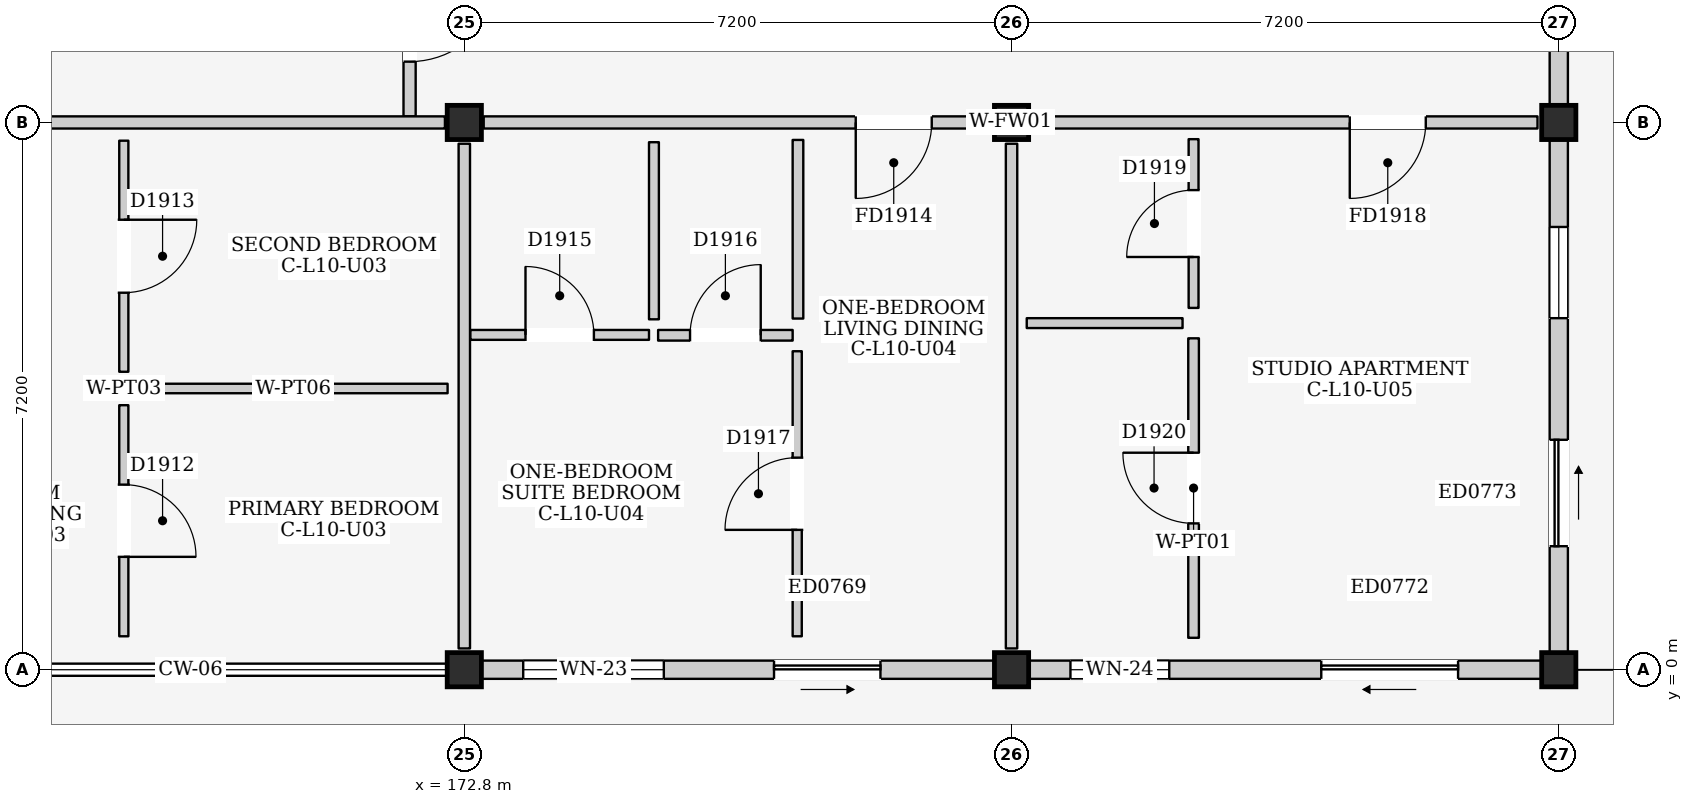
"""IFC4 building model, lengths in metres.
Left out: names, types, materials, properties, quantities, classifications, styles, units other than length and angle.
Written with IfcOpenShell. Run it as: python <this file> out.ifc"""

import sys

from ifc_helpers import new_model, si_unit, direction, frame, frame_2d, origin, origin_2d, place, context, subcontext, project, spatial, rectangle, extrude, element, fill, save


model = new_model("IFC4")
c1 = context("Model", 3, precision=1e-05, world=origin(), true_north=direction((0.0, 1.0)))
c2 = subcontext(c1, "Body", "Model", "MODEL_VIEW")
j1 = project(units=[si_unit("LENGTHUNIT", "METRE"), si_unit("PLANEANGLEUNIT", "RADIAN")], contexts=[c1])
p1 = place(None, origin())
s1 = spatial("IfcSite", under=j1, at=p1, CompositionType="ELEMENT")
p2 = place(p1, origin())
s2 = spatial("IfcBuilding", under=s1, at=p2, CompositionType="ELEMENT")
p3 = place(p2, frame((0.0, 0.0, 34.8)))
s3 = spatial("IfcBuildingStorey", under=s2, at=p3, CompositionType="ELEMENT", Elevation=34.8)
for number, where, z_axis, x_axis in (
    (1, (172.8, 0.0, 0.0), (0.0, 0.0, 1.0), (1.0, 0.0, 0.0)),
    (2, (172.8, 7.2, 0.0), (0.0, 0.0, 1.0), (1.0, 0.0, 0.0)),
    (3, (180.0, 0.0, 0.0), (0.0, 0.0, 1.0), (1.0, 0.0, 0.0)),
    (4, (180.0, 7.2, 0.0), (0.0, 0.0, 1.0), (1.0, 0.0, 0.0)),
    (5, (187.2, 0.0, 0.0), (0.0, 0.0, 1.0), (1.0, 0.0, 0.0)),
    (6, (187.2, 7.2, 0.0), (0.0, 0.0, 1.0), (1.0, 0.0, 0.0)),
):
    element("IfcColumn", number, at=place(p3, frame(where, z_axis=z_axis, x_axis=x_axis)), inside=s3, PredefinedType="COLUMN", context=c2, shape_type="SweptSolid", body=[
        extrude(rectangle(XDim=0.45, YDim=0.45, at=origin_2d()), origin(), (0.0, 0.0, 1.0), 3.2),
    ])
p4 = place(p3, frame((173.025, 0.0, 0.0), z_axis=(0.0, 0.0, 1.0), x_axis=(1.0, 0.0, 0.0)))
e7 = element("IfcWall", 7, at=p4, inside=s3, PredefinedType="ELEMENTEDWALL", context=c2, shape_type="SweptSolid", body=[
    extrude(rectangle(XDim=6.75, YDim=0.24, at=frame_2d((3.375, 0.0))), origin(), (0.0, 0.0, 1.0), 2.495),
])
p5 = place(p4, frame((3.85, 0.0, 0.0)))
e8 = element("IfcOpeningElement", 8, at=p5, cuts=e7, PredefinedType="OPENING", context=c2, shape_type="SweptSolid", body=[
    extrude(rectangle(XDim=1.4, YDim=2.1, at=frame_2d((0.7, 1.05))), frame((0.0, 0.135, 0.0), z_axis=(0.0, -1.0, 0.0), x_axis=(1.0, 0.0, 0.0)), (0.0, 0.0, 1.0), 0.27),
])
p6 = place(p4, frame((0.55, 0.0, 0.9)))
e9 = element("IfcOpeningElement", 9, at=p6, cuts=e7, PredefinedType="OPENING", context=c2, shape_type="SweptSolid", body=[
    extrude(rectangle(XDim=1.85, YDim=1.4, at=frame_2d((0.925, 0.7))), frame((0.0, 0.135, 0.0), z_axis=(0.0, -1.0, 0.0), x_axis=(1.0, 0.0, 0.0)), (0.0, 0.0, 1.0), 0.27),
])
p7 = place(p3, frame((180.225, 0.0, 0.0), z_axis=(0.0, 0.0, 1.0), x_axis=(1.0, 0.0, 0.0)))
e10 = element("IfcWall", 10, at=p7, inside=s3, PredefinedType="ELEMENTEDWALL", context=c2, shape_type="SweptSolid", body=[
    extrude(rectangle(XDim=6.75, YDim=0.24, at=frame_2d((3.375, 0.0))), origin(), (0.0, 0.0, 1.0), 2.495),
])
p8 = place(p7, frame((3.85, 0.0, 0.0)))
e11 = element("IfcOpeningElement", 11, at=p8, cuts=e10, PredefinedType="OPENING", context=c2, shape_type="SweptSolid", body=[
    extrude(rectangle(XDim=1.8, YDim=2.12, at=frame_2d((0.9, 1.06))), frame((0.0, 0.135, 0.0), z_axis=(0.0, -1.0, 0.0), x_axis=(1.0, 0.0, 0.0)), (0.0, 0.0, 1.0), 0.27),
])
p9 = place(p7, frame((0.55, 0.0, 0.9)))
e12 = element("IfcOpeningElement", 12, at=p9, cuts=e10, PredefinedType="OPENING", context=c2, shape_type="SweptSolid", body=[
    extrude(rectangle(XDim=1.3, YDim=1.25, at=frame_2d((0.65, 0.625))), frame((0.0, 0.135, 0.0), z_axis=(0.0, -1.0, 0.0), x_axis=(1.0, 0.0, 0.0)), (0.0, 0.0, 1.0), 0.27),
])
p10 = place(p3, frame((187.2, 0.225, 0.0), z_axis=(0.0, 0.0, 1.0), x_axis=(0.0, 1.0, 0.0)))
e13 = element("IfcWall", 13, at=p10, inside=s3, PredefinedType="ELEMENTEDWALL", context=c2, shape_type="SweptSolid", body=[
    extrude(rectangle(XDim=6.75, YDim=0.24, at=frame_2d((3.375, 0.0))), origin(), (0.0, 0.0, 1.0), 2.495),
])
p11 = place(p10, frame((1.4, 0.0, 0.0)))
e14 = element("IfcOpeningElement", 14, at=p11, cuts=e13, PredefinedType="OPENING", context=c2, shape_type="SweptSolid", body=[
    extrude(rectangle(XDim=1.4, YDim=2.1, at=frame_2d((0.7, 1.05))), frame((0.0, 0.135, 0.0), z_axis=(0.0, -1.0, 0.0), x_axis=(1.0, 0.0, 0.0)), (0.0, 0.0, 1.0), 0.27),
])
p12 = place(p10, frame((4.4, 0.0, 0.95)))
e15 = element("IfcOpeningElement", 15, at=p12, cuts=e13, PredefinedType="OPENING", context=c2, shape_type="SweptSolid", body=[
    extrude(rectangle(XDim=1.2, YDim=1.35, at=frame_2d((0.6, 0.675))), frame((0.0, 0.135, 0.0), z_axis=(0.0, -1.0, 0.0), x_axis=(1.0, 0.0, 0.0)), (0.0, 0.0, 1.0), 0.27),
])
p13 = place(p3, frame((187.2, 7.425, 0.0), z_axis=(0.0, 0.0, 1.0), x_axis=(0.0, 1.0, 0.0)))
e16 = element("IfcWall", 16, at=p13, inside=s3, PredefinedType="ELEMENTEDWALL", context=c2, shape_type="SweptSolid", body=[
    extrude(rectangle(XDim=6.75, YDim=0.24, at=frame_2d((3.375, 0.0))), origin(), (0.0, 0.0, 1.0), 2.495),
])
p14 = place(p13, frame((3.65, 0.0, 0.0)))
e17 = element("IfcOpeningElement", 17, at=p14, cuts=e16, PredefinedType="OPENING", context=c2, shape_type="SweptSolid", body=[
    extrude(rectangle(XDim=1.4, YDim=2.1, at=frame_2d((0.7, 1.05))), frame((0.0, 0.135, 0.0), z_axis=(0.0, -1.0, 0.0), x_axis=(1.0, 0.0, 0.0)), (0.0, 0.0, 1.0), 0.27),
])
p15 = place(p3, frame((172.08, 7.28, 0.0), z_axis=(0.0, 0.0, 1.0), x_axis=(0.0, 1.0, 0.0)))
e18 = element("IfcWall", 18, at=p15, inside=s3, PredefinedType="PARTITIONING", context=c2, shape_type="SweptSolid", body=[
    extrude(rectangle(XDim=4.32, YDim=0.16, at=frame_2d((2.16, 0.0))), origin(), (0.0, 0.0, 1.0), 2.96),
])
p16 = place(p15, frame((0.72, 0.0, 0.0)))
e19 = element("IfcOpeningElement", 19, at=p16, cuts=e18, PredefinedType="OPENING", context=c2, shape_type="SweptSolid", body=[
    extrude(rectangle(XDim=1.2, YDim=2.2, at=frame_2d((0.6, 1.1))), frame((0.0, 0.095, 0.0), z_axis=(0.0, -1.0, 0.0), x_axis=(1.0, 0.0, 0.0)), (0.0, 0.0, 1.0), 0.19),
])
p17 = place(p3, frame((165.855, 7.2, 0.0), z_axis=(0.0, 0.0, 1.0), x_axis=(1.0, 0.0, 0.0)))
e20 = element("IfcWall", 20, at=p17, inside=s3, PredefinedType="PARTITIONING", context=c2, shape_type="SweptSolid", body=[
    extrude(rectangle(XDim=6.69, YDim=0.16, at=frame_2d((3.345, 0.0))), origin(), (0.0, 0.0, 1.0), 2.345),
])
p18 = place(p3, frame((172.8, 0.28, 0.0), z_axis=(0.0, 0.0, 1.0), x_axis=(0.0, 1.0, 0.0)))
e21 = element("IfcWall", 21, at=p18, inside=s3, PredefinedType="PARTITIONING", context=c2, shape_type="SweptSolid", body=[
    extrude(rectangle(XDim=6.64, YDim=0.15, at=frame_2d((3.32, 0.0))), origin(), (0.0, 0.0, 1.0), 2.445),
])
p19 = place(p3, frame((168.32, 0.44, 0.0), z_axis=(0.0, 0.0, 1.0), x_axis=(0.0, 1.0, 0.0)))
e22 = element("IfcWall", 22, at=p19, inside=s3, PredefinedType="PARTITIONING", context=c2, shape_type="SweptSolid", body=[
    extrude(rectangle(XDim=3.04, YDim=0.12, at=frame_2d((1.52, 0.0))), origin(), (0.0, 0.0, 1.0), 2.96),
])
p20 = place(p19, frame((1.045, 0.0, 0.0)))
e23 = element("IfcOpeningElement", 23, at=p20, cuts=e22, PredefinedType="OPENING", context=c2, shape_type="SweptSolid", body=[
    extrude(rectangle(XDim=0.95, YDim=2.15, at=frame_2d((0.475, 1.075))), frame((0.0, 0.075, 0.0), z_axis=(0.0, -1.0, 0.0), x_axis=(1.0, 0.0, 0.0)), (0.0, 0.0, 1.0), 0.15),
])
p21 = place(p3, frame((168.52, 3.7, 0.0), z_axis=(0.0, 0.0, 1.0), x_axis=(1.0, 0.0, 0.0)))
e24 = element("IfcWall", 24, at=p21, inside=s3, PredefinedType="PARTITIONING", context=c2, shape_type="SweptSolid", body=[
    extrude(rectangle(XDim=4.06, YDim=0.125, at=frame_2d((2.03, 0.0))), origin(), (0.0, 0.0, 1.0), 2.96),
])
p22 = place(p3, frame((168.32, 3.92, 0.0), z_axis=(0.0, 0.0, 1.0), x_axis=(0.0, 1.0, 0.0)))
e25 = element("IfcWall", 25, at=p22, inside=s3, PredefinedType="PARTITIONING", context=c2, shape_type="SweptSolid", body=[
    extrude(rectangle(XDim=3.04, YDim=0.12, at=frame_2d((1.52, 0.0))), origin(), (0.0, 0.0, 1.0), 2.96),
])
p23 = place(p22, frame((1.04, 0.0, 0.0)))
e26 = element("IfcOpeningElement", 26, at=p23, cuts=e25, PredefinedType="OPENING", context=c2, shape_type="SweptSolid", body=[
    extrude(rectangle(XDim=0.96, YDim=2.15, at=frame_2d((0.48, 1.075))), frame((0.0, 0.075, 0.0), z_axis=(0.0, -1.0, 0.0), x_axis=(1.0, 0.0, 0.0)), (0.0, 0.0, 1.0), 0.15),
])
p24 = place(p3, frame((173.055, 7.2, 0.0), z_axis=(0.0, 0.0, 1.0), x_axis=(1.0, 0.0, 0.0)))
e27 = element("IfcWall", 27, at=p24, inside=s3, PredefinedType="PARTITIONING", context=c2, shape_type="SweptSolid", body=[
    extrude(rectangle(XDim=6.69, YDim=0.16, at=frame_2d((3.345, 0.0))), origin(), (0.0, 0.0, 1.0), 2.345),
])
p25 = place(p24, frame((4.895, 0.0, 0.0)))
e28 = element("IfcOpeningElement", 28, at=p25, cuts=e27, PredefinedType="OPENING", context=c2, shape_type="SweptSolid", body=[
    extrude(rectangle(XDim=1.0, YDim=2.15, at=frame_2d((0.5, 1.075))), frame((0.0, 0.095, 0.0), z_axis=(0.0, -1.0, 0.0), x_axis=(1.0, 0.0, 0.0)), (0.0, 0.0, 1.0), 0.19),
])
p26 = place(p3, frame((180.0, 0.28, 0.0), z_axis=(0.0, 0.0, 1.0), x_axis=(0.0, 1.0, 0.0)))
e29 = element("IfcWall", 29, at=p26, inside=s3, PredefinedType="PARTITIONING", context=c2, shape_type="SweptSolid", body=[
    extrude(rectangle(XDim=6.64, YDim=0.15, at=frame_2d((3.32, 0.0))), origin(), (0.0, 0.0, 1.0), 2.445),
])
p27 = place(p3, frame((172.88, 4.405, 0.0), z_axis=(0.0, 0.0, 1.0), x_axis=(1.0, 0.0, 0.0)))
e30 = element("IfcWall", 30, at=p27, inside=s3, PredefinedType="PARTITIONING", context=c2, shape_type="SweptSolid", body=[
    extrude(rectangle(XDim=2.35, YDim=0.13, at=frame_2d((1.175, 0.0))), origin(), (0.0, 0.0, 1.0), 2.96),
])
p28 = place(p27, frame((0.725, 0.0, 0.0)))
e31 = element("IfcOpeningElement", 31, at=p28, cuts=e30, PredefinedType="OPENING", context=c2, shape_type="SweptSolid", body=[
    extrude(rectangle(XDim=0.9, YDim=2.1, at=frame_2d((0.45, 1.05))), frame((0.0, 0.08, 0.0), z_axis=(0.0, -1.0, 0.0), x_axis=(1.0, 0.0, 0.0)), (0.0, 0.0, 1.0), 0.16),
])
p29 = place(p3, frame((175.295, 4.61, 0.0), z_axis=(0.0, 0.0, 1.0), x_axis=(0.0, 1.0, 0.0)))
e32 = element("IfcWall", 32, at=p29, inside=s3, PredefinedType="PARTITIONING", context=c2, shape_type="SweptSolid", body=[
    extrude(rectangle(XDim=2.33, YDim=0.13, at=frame_2d((1.165, 0.0))), origin(), (0.0, 0.0, 1.0), 2.96),
])
p30 = place(p3, frame((175.35, 4.4, 0.0), z_axis=(0.0, 0.0, 1.0), x_axis=(1.0, 0.0, 0.0)))
e33 = element("IfcWall", 33, at=p30, inside=s3, PredefinedType="PARTITIONING", context=c2, shape_type="SweptSolid", body=[
    extrude(rectangle(XDim=1.77, YDim=0.14, at=frame_2d((0.885, 0.0))), origin(), (0.0, 0.0, 1.0), 2.96),
])
p31 = place(p30, frame((0.42, 0.0, 0.0)))
e34 = element("IfcOpeningElement", 34, at=p31, cuts=e33, PredefinedType="OPENING", context=c2, shape_type="SweptSolid", body=[
    extrude(rectangle(XDim=0.93, YDim=2.14, at=frame_2d((0.465, 1.07))), frame((0.0, 0.085, 0.0), z_axis=(0.0, -1.0, 0.0), x_axis=(1.0, 0.0, 0.0)), (0.0, 0.0, 1.0), 0.17),
])
p32 = place(p3, frame((177.19, 4.62, 0.0), z_axis=(0.0, 0.0, 1.0), x_axis=(0.0, 1.0, 0.0)))
e35 = element("IfcWall", 35, at=p32, inside=s3, PredefinedType="PARTITIONING", context=c2, shape_type="SweptSolid", body=[
    extrude(rectangle(XDim=2.35, YDim=0.14, at=frame_2d((1.175, 0.0))), origin(), (0.0, 0.0, 1.0), 2.96),
])
p33 = place(p3, frame((177.18, 0.44, 0.0), z_axis=(0.0, 0.0, 1.0), x_axis=(0.0, 1.0, 0.0)))
e36 = element("IfcWall", 36, at=p33, inside=s3, PredefinedType="PARTITIONING", context=c2, shape_type="SweptSolid", body=[
    extrude(rectangle(XDim=3.75, YDim=0.12, at=frame_2d((1.875, 0.0))), origin(), (0.0, 0.0, 1.0), 2.96),
])
p34 = place(p33, frame((1.4, 0.0, 0.0)))
e37 = element("IfcOpeningElement", 37, at=p34, cuts=e36, PredefinedType="OPENING", context=c2, shape_type="SweptSolid", body=[
    extrude(rectangle(XDim=0.95, YDim=2.15, at=frame_2d((0.475, 1.075))), frame((0.0, 0.075, 0.0), z_axis=(0.0, -1.0, 0.0), x_axis=(1.0, 0.0, 0.0)), (0.0, 0.0, 1.0), 0.15),
])
p35 = place(p3, frame((180.255, 7.2, 0.0), z_axis=(0.0, 0.0, 1.0), x_axis=(1.0, 0.0, 0.0)))
e38 = element("IfcWall", 38, at=p35, inside=s3, PredefinedType="PARTITIONING", context=c2, shape_type="SweptSolid", body=[
    extrude(rectangle(XDim=6.665, YDim=0.16, at=frame_2d((3.333, 0.0))), origin(), (0.0, 0.0, 1.0), 2.345),
])
p36 = place(p35, frame((4.195, 0.0, 0.0)))
e39 = element("IfcOpeningElement", 39, at=p36, cuts=e38, PredefinedType="OPENING", context=c2, shape_type="SweptSolid", body=[
    extrude(rectangle(XDim=1.0, YDim=2.15, at=frame_2d((0.5, 1.075))), frame((0.0, 0.095, 0.0), z_axis=(0.0, -1.0, 0.0), x_axis=(1.0, 0.0, 0.0)), (0.0, 0.0, 1.0), 0.19),
])
p37 = place(p3, frame((180.2, 4.56, 0.0), z_axis=(0.0, 0.0, 1.0), x_axis=(1.0, 0.0, 0.0)))
e40 = element("IfcWall", 40, at=p37, inside=s3, PredefinedType="PARTITIONING", context=c2, shape_type="SweptSolid", body=[
    extrude(rectangle(XDim=2.05, YDim=0.13, at=frame_2d((1.025, 0.0))), origin(), (0.0, 0.0, 1.0), 2.96),
])
p38 = place(p3, frame((182.395, 4.76, 0.0), z_axis=(0.0, 0.0, 1.0), x_axis=(0.0, 1.0, 0.0)))
e41 = element("IfcWall", 41, at=p38, inside=s3, PredefinedType="PARTITIONING", context=c2, shape_type="SweptSolid", body=[
    extrude(rectangle(XDim=2.22, YDim=0.13, at=frame_2d((1.11, 0.0))), origin(), (0.0, 0.0, 1.0), 2.96),
])
p39 = place(p38, frame((0.67, 0.0, 0.0)))
e42 = element("IfcOpeningElement", 42, at=p39, cuts=e41, PredefinedType="OPENING", context=c2, shape_type="SweptSolid", body=[
    extrude(rectangle(XDim=0.88, YDim=2.1, at=frame_2d((0.44, 1.05))), frame((0.0, 0.08, 0.0), z_axis=(0.0, -1.0, 0.0), x_axis=(1.0, 0.0, 0.0)), (0.0, 0.0, 1.0), 0.16),
])
p40 = place(p3, frame((182.395, 0.42, 0.0), z_axis=(0.0, 0.0, 1.0), x_axis=(0.0, 1.0, 0.0)))
e43 = element("IfcWall", 43, at=p40, inside=s3, PredefinedType="PARTITIONING", context=c2, shape_type="SweptSolid", body=[
    extrude(rectangle(XDim=3.94, YDim=0.14, at=frame_2d((1.97, 0.0))), origin(), (0.0, 0.0, 1.0), 2.96),
])
p41 = place(p40, frame((1.505, 0.0, 0.0)))
e44 = element("IfcOpeningElement", 44, at=p41, cuts=e43, PredefinedType="OPENING", context=c2, shape_type="SweptSolid", body=[
    extrude(rectangle(XDim=0.93, YDim=2.14, at=frame_2d((0.465, 1.07))), frame((0.0, 0.085, 0.0), z_axis=(0.0, -1.0, 0.0), x_axis=(1.0, 0.0, 0.0)), (0.0, 0.0, 1.0), 0.17),
])
p42 = place(p5, frame((1.4, 0.0, 0.0), z_axis=(0.0, 0.0, 1.0), x_axis=(-1.0, 0.0, 0.0)))
e45 = element("IfcDoor", 45, at=p42, inside=s3, OperationType="SLIDING_TO_RIGHT", PredefinedType="DOOR", context=c2, shape_type="SweptSolid", body=[
    extrude(rectangle(XDim=1.4, YDim=2.1, at=frame_2d((0.7, 1.05))), frame((0.0, 0.025, 0.0), z_axis=(0.0, -1.0, 0.0), x_axis=(1.0, 0.0, 0.0)), (0.0, 0.0, 1.0), 0.05),
])
fill(e8, e45)
p43 = place(p6, origin())
e46 = element("IfcWindow", 46, at=p43, inside=s3, PartitioningType="DOUBLE_PANEL_VERTICAL", PredefinedType="WINDOW", context=c2, shape_type="SweptSolid", body=[
    extrude(rectangle(XDim=1.85, YDim=1.4, at=frame_2d((0.925, 0.7))), frame((0.0, 0.03, 0.0), z_axis=(0.0, -1.0, 0.0), x_axis=(1.0, 0.0, 0.0)), (0.0, 0.0, 1.0), 0.06),
])
fill(e9, e46)
p44 = place(p8, frame((1.8, 0.0, 0.0), z_axis=(0.0, 0.0, 1.0), x_axis=(-1.0, 0.0, 0.0)))
e47 = element("IfcDoor", 47, at=p44, inside=s3, OperationType="SLIDING_TO_LEFT", PredefinedType="DOOR", context=c2, shape_type="SweptSolid", body=[
    extrude(rectangle(XDim=1.8, YDim=2.12, at=frame_2d((0.9, 1.06))), frame((0.0, 0.025, 0.0), z_axis=(0.0, -1.0, 0.0), x_axis=(1.0, 0.0, 0.0)), (0.0, 0.0, 1.0), 0.05),
])
fill(e11, e47)
p45 = place(p9, origin())
e48 = element("IfcWindow", 48, at=p45, inside=s3, PartitioningType="SINGLE_PANEL", PredefinedType="WINDOW", context=c2, shape_type="SweptSolid", body=[
    extrude(rectangle(XDim=1.3, YDim=1.25, at=frame_2d((0.65, 0.625))), frame((0.0, 0.03, 0.0), z_axis=(0.0, -1.0, 0.0), x_axis=(1.0, 0.0, 0.0)), (0.0, 0.0, 1.0), 0.06),
])
fill(e12, e48)
p46 = place(p11, frame((1.4, 0.0, 0.0), z_axis=(0.0, 0.0, 1.0), x_axis=(-1.0, 0.0, 0.0)))
e49 = element("IfcDoor", 49, at=p46, inside=s3, OperationType="SLIDING_TO_RIGHT", PredefinedType="DOOR", context=c2, shape_type="SweptSolid", body=[
    extrude(rectangle(XDim=1.4, YDim=2.1, at=frame_2d((0.7, 1.05))), frame((0.0, 0.025, 0.0), z_axis=(0.0, -1.0, 0.0), x_axis=(1.0, 0.0, 0.0)), (0.0, 0.0, 1.0), 0.05),
])
fill(e14, e49)
p47 = place(p12, origin())
e50 = element("IfcWindow", 50, at=p47, inside=s3, PartitioningType="SINGLE_PANEL", PredefinedType="WINDOW", context=c2, shape_type="SweptSolid", body=[
    extrude(rectangle(XDim=1.2, YDim=1.35, at=frame_2d((0.6, 0.675))), frame((0.0, 0.03, 0.0), z_axis=(0.0, -1.0, 0.0), x_axis=(1.0, 0.0, 0.0)), (0.0, 0.0, 1.0), 0.06),
])
fill(e15, e50)
p48 = place(p16, frame((1.2, 0.0, 0.0), z_axis=(0.0, 0.0, 1.0), x_axis=(-1.0, 0.0, 0.0)))
e51 = element("IfcDoor", 51, at=p48, inside=s3, OperationType="SINGLE_SWING_LEFT", PredefinedType="DOOR", context=c2, shape_type="SweptSolid", body=[
    extrude(rectangle(XDim=1.2, YDim=2.2, at=frame_2d((0.6, 1.1))), frame((0.0, 0.025, 0.0), z_axis=(0.0, -1.0, 0.0), x_axis=(1.0, 0.0, 0.0)), (0.0, 0.0, 1.0), 0.05),
])
fill(e19, e51)
p49 = place(p20, frame((0.95, 0.0, 0.0), z_axis=(0.0, 0.0, 1.0), x_axis=(-1.0, 0.0, 0.0)))
e52 = element("IfcDoor", 52, at=p49, inside=s3, OperationType="SINGLE_SWING_RIGHT", PredefinedType="DOOR", context=c2, shape_type="SweptSolid", body=[
    extrude(rectangle(XDim=0.95, YDim=2.15, at=frame_2d((0.475, 1.075))), frame((0.0, 0.025, 0.0), z_axis=(0.0, -1.0, 0.0), x_axis=(1.0, 0.0, 0.0)), (0.0, 0.0, 1.0), 0.05),
])
fill(e23, e52)
p50 = place(p23, frame((0.96, 0.0, 0.0), z_axis=(0.0, 0.0, 1.0), x_axis=(-1.0, 0.0, 0.0)))
e53 = element("IfcDoor", 53, at=p50, inside=s3, OperationType="SINGLE_SWING_LEFT", PredefinedType="DOOR", context=c2, shape_type="SweptSolid", body=[
    extrude(rectangle(XDim=0.96, YDim=2.15, at=frame_2d((0.48, 1.075))), frame((0.0, 0.025, 0.0), z_axis=(0.0, -1.0, 0.0), x_axis=(1.0, 0.0, 0.0)), (0.0, 0.0, 1.0), 0.05),
])
fill(e26, e53)
p51 = place(p25, frame((1.0, 0.0, 0.0), z_axis=(0.0, 0.0, 1.0), x_axis=(-1.0, 0.0, 0.0)))
e54 = element("IfcDoor", 54, at=p51, inside=s3, OperationType="SINGLE_SWING_RIGHT", PredefinedType="DOOR", context=c2, shape_type="SweptSolid", body=[
    extrude(rectangle(XDim=1.0, YDim=2.15, at=frame_2d((0.5, 1.075))), frame((0.0, 0.025, 0.0), z_axis=(0.0, -1.0, 0.0), x_axis=(1.0, 0.0, 0.0)), (0.0, 0.0, 1.0), 0.05),
])
fill(e28, e54)
p52 = place(p28, origin())
e55 = element("IfcDoor", 55, at=p52, inside=s3, OperationType="SINGLE_SWING_LEFT", PredefinedType="DOOR", context=c2, shape_type="SweptSolid", body=[
    extrude(rectangle(XDim=0.9, YDim=2.1, at=frame_2d((0.45, 1.05))), frame((0.0, 0.025, 0.0), z_axis=(0.0, -1.0, 0.0), x_axis=(1.0, 0.0, 0.0)), (0.0, 0.0, 1.0), 0.05),
])
fill(e31, e55)
p53 = place(p31, origin())
e56 = element("IfcDoor", 56, at=p53, inside=s3, OperationType="SINGLE_SWING_RIGHT", PredefinedType="DOOR", context=c2, shape_type="SweptSolid", body=[
    extrude(rectangle(XDim=0.93, YDim=2.14, at=frame_2d((0.465, 1.07))), frame((0.0, 0.025, 0.0), z_axis=(0.0, -1.0, 0.0), x_axis=(1.0, 0.0, 0.0)), (0.0, 0.0, 1.0), 0.05),
])
fill(e34, e56)
p54 = place(p34, origin())
e57 = element("IfcDoor", 57, at=p54, inside=s3, OperationType="SINGLE_SWING_LEFT", PredefinedType="DOOR", context=c2, shape_type="SweptSolid", body=[
    extrude(rectangle(XDim=0.95, YDim=2.15, at=frame_2d((0.475, 1.075))), frame((0.0, 0.025, 0.0), z_axis=(0.0, -1.0, 0.0), x_axis=(1.0, 0.0, 0.0)), (0.0, 0.0, 1.0), 0.05),
])
fill(e37, e57)
p55 = place(p36, frame((1.0, 0.0, 0.0), z_axis=(0.0, 0.0, 1.0), x_axis=(-1.0, 0.0, 0.0)))
e58 = element("IfcDoor", 58, at=p55, inside=s3, OperationType="SINGLE_SWING_RIGHT", PredefinedType="DOOR", context=c2, shape_type="SweptSolid", body=[
    extrude(rectangle(XDim=1.0, YDim=2.15, at=frame_2d((0.5, 1.075))), frame((0.0, 0.025, 0.0), z_axis=(0.0, -1.0, 0.0), x_axis=(1.0, 0.0, 0.0)), (0.0, 0.0, 1.0), 0.05),
])
fill(e39, e58)
p56 = place(p39, origin())
e59 = element("IfcDoor", 59, at=p56, inside=s3, OperationType="SINGLE_SWING_LEFT", PredefinedType="DOOR", context=c2, shape_type="SweptSolid", body=[
    extrude(rectangle(XDim=0.88, YDim=2.1, at=frame_2d((0.44, 1.05))), frame((0.0, 0.025, 0.0), z_axis=(0.0, -1.0, 0.0), x_axis=(1.0, 0.0, 0.0)), (0.0, 0.0, 1.0), 0.05),
])
fill(e42, e59)
p57 = place(p41, origin())
e60 = element("IfcDoor", 60, at=p57, inside=s3, OperationType="SINGLE_SWING_RIGHT", PredefinedType="DOOR", context=c2, shape_type="SweptSolid", body=[
    extrude(rectangle(XDim=0.93, YDim=2.14, at=frame_2d((0.465, 1.07))), frame((0.0, 0.025, 0.0), z_axis=(0.0, -1.0, 0.0), x_axis=(1.0, 0.0, 0.0)), (0.0, 0.0, 1.0), 0.05),
])
fill(e44, e60)
save(model, sys.argv[1])
